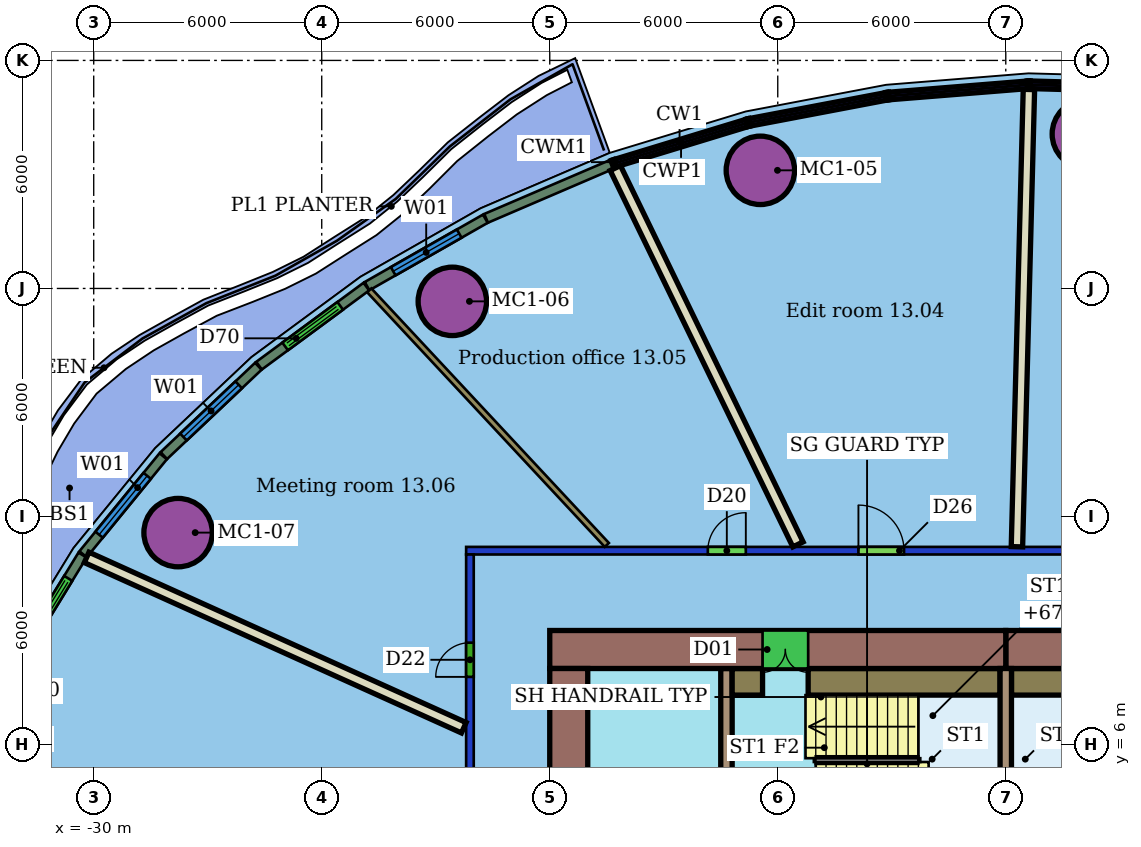
"""IFC4 building model, lengths in metres.
Left out: names, types, materials, properties, quantities, classifications, styles, units other than length and angle.
Written with IfcOpenShell. Run it as: python <this file> out.ifc"""

import sys

from ifc_helpers import new_model, si_unit, direction, frame, frame_2d, origin, origin_2d, place, context, subcontext, project, spatial, rectangle, hollow_circle, extrude, element, fill, save


model = new_model("IFC4")
c1 = context("Model", 3, precision=1e-05, world=origin(), true_north=direction((0.0, 1.0)))
c2 = subcontext(c1, "Body", "Model", "MODEL_VIEW")
j1 = project(units=[si_unit("LENGTHUNIT", "METRE"), si_unit("PLANEANGLEUNIT", "RADIAN")], contexts=[c1])
p1 = place(None, origin())
s1 = spatial("IfcSite", under=j1, at=p1, CompositionType="ELEMENT")
p2 = place(p1, origin())
s2 = spatial("IfcBuilding", under=s1, at=p2, CompositionType="ELEMENT")
p3 = place(p2, frame((0.0, 0.0, 65.6)))
s3 = spatial("IfcBuildingStorey", under=s2, at=p3, CompositionType="ELEMENT", Elevation=65.6)
for number, where, z_axis, x_axis in (
    (1, (-3.879, 22.064, 0.0), (0.0, 0.0, 1.0), (1.0, 0.0, 0.0)),
    (2, (-12.458, 21.108, 0.0), (0.0, 0.0, 1.0), (1.0, 0.0, 0.0)),
    (3, (-20.563, 17.66, 0.0), (0.0, 0.0, 1.0), (1.0, 0.0, 0.0)),
    (4, (-27.78, 11.576, 0.0), (0.0, 0.0, 1.0), (1.0, 0.0, 0.0)),
):
    element("IfcColumn", number, at=place(p3, frame(where, z_axis=z_axis, x_axis=x_axis)), inside=s3, PredefinedType="COLUMN", context=c2, shape_type="SweptSolid", body=[
        extrude(hollow_circle(Radius=0.9, WallThickness=0.06, at=origin_2d()), origin(), (0.0, 0.0, 1.0), 3.55),
    ])
p4 = place(p3, frame((-20.1, -11.0, 0.0), z_axis=(0.0, 0.0, 1.0), x_axis=(0.0, 1.0, 0.0)))
e5 = element("IfcWall", 5, at=p4, inside=s3, PredefinedType="PARTITIONING", context=c2, shape_type="SweptSolid", body=[
    extrude(rectangle(XDim=22.0, YDim=0.2, at=frame_2d((11.0, 0.0))), origin(), (0.0, 0.0, 1.0), 2.85),
])
p5 = place(p4, frame((18.78, 0.0, 0.0)))
e6 = element("IfcOpeningElement", 6, at=p5, cuts=e5, PredefinedType="OPENING", context=c2, shape_type="SweptSolid", body=[
    extrude(rectangle(XDim=0.9, YDim=2.1, at=frame_2d((0.45, 1.05))), frame((0.0, 0.11, 0.0), z_axis=(0.0, -1.0, 0.0), x_axis=(1.0, 0.0, 0.0)), (0.0, 0.0, 1.0), 0.22),
])
p6 = place(p4, frame((14.403, 0.0, 0.0)))
e7 = element("IfcOpeningElement", 7, at=p6, cuts=e5, PredefinedType="OPENING", context=c2, shape_type="SweptSolid", body=[
    extrude(rectangle(XDim=1.1, YDim=2.1, at=frame_2d((0.55, 1.05))), frame((0.0, 0.11, 0.0), z_axis=(0.0, -1.0, 0.0), x_axis=(1.0, 0.0, 0.0)), (0.0, 0.0, 1.0), 0.22),
])
p7 = place(p4, frame((5.9, 0.0, 0.0)))
e8 = element("IfcOpeningElement", 8, at=p7, cuts=e5, PredefinedType="OPENING", context=c2, shape_type="SweptSolid", body=[
    extrude(rectangle(XDim=0.9, YDim=2.1, at=frame_2d((0.45, 1.05))), frame((0.0, 0.11, 0.0), z_axis=(0.0, -1.0, 0.0), x_axis=(1.0, 0.0, 0.0)), (0.0, 0.0, 1.0), 0.22),
])
p8 = place(p4, frame((1.826, 0.0, 0.0)))
e9 = element("IfcOpeningElement", 9, at=p8, cuts=e5, PredefinedType="OPENING", context=c2, shape_type="SweptSolid", body=[
    extrude(rectangle(XDim=1.0, YDim=2.1, at=frame_2d((0.5, 1.05))), frame((0.0, 0.11, 0.0), z_axis=(0.0, -1.0, 0.0), x_axis=(1.0, 0.0, 0.0)), (0.0, 0.0, 1.0), 0.22),
])
p9 = place(p3, frame((-20.2, 11.1, 0.0), z_axis=(0.0, 0.0, 1.0), x_axis=(1.0, 0.0, 0.0)))
e10 = element("IfcWall", 10, at=p9, inside=s3, PredefinedType="PARTITIONING", context=c2, shape_type="SweptSolid", body=[
    extrude(rectangle(XDim=28.4, YDim=0.2, at=frame_2d((14.2, 0.0))), origin(), (0.0, 0.0, 1.0), 2.85),
])
p10 = place(p9, frame((23.828, 0.0, 0.0)))
e11 = element("IfcOpeningElement", 11, at=p10, cuts=e10, PredefinedType="OPENING", context=c2, shape_type="SweptSolid", body=[
    extrude(rectangle(XDim=1.5, YDim=2.1, at=frame_2d((0.75, 1.05))), frame((0.0, 0.11, 0.0), z_axis=(0.0, -1.0, 0.0), x_axis=(1.0, 0.0, 0.0)), (0.0, 0.0, 1.0), 0.22),
])
p11 = place(p9, frame((19.006, 0.0, 0.0)))
e12 = element("IfcOpeningElement", 12, at=p11, cuts=e10, PredefinedType="OPENING", context=c2, shape_type="SweptSolid", body=[
    extrude(rectangle(XDim=1.0, YDim=2.1, at=frame_2d((0.5, 1.05))), frame((0.0, 0.11, 0.0), z_axis=(0.0, -1.0, 0.0), x_axis=(1.0, 0.0, 0.0)), (0.0, 0.0, 1.0), 0.22),
])
p12 = place(p9, frame((10.323, 0.0, 0.0)))
e13 = element("IfcOpeningElement", 13, at=p12, cuts=e10, PredefinedType="OPENING", context=c2, shape_type="SweptSolid", body=[
    extrude(rectangle(XDim=1.2, YDim=2.1, at=frame_2d((0.6, 1.05))), frame((0.0, 0.11, 0.0), z_axis=(0.0, -1.0, 0.0), x_axis=(1.0, 0.0, 0.0)), (0.0, 0.0, 1.0), 0.22),
])
p13 = place(p9, frame((6.36, 0.0, 0.0)))
e14 = element("IfcOpeningElement", 14, at=p13, cuts=e10, PredefinedType="OPENING", context=c2, shape_type="SweptSolid", body=[
    extrude(rectangle(XDim=1.0, YDim=2.1, at=frame_2d((0.5, 1.05))), frame((0.0, 0.11, 0.0), z_axis=(0.0, -1.0, 0.0), x_axis=(1.0, 0.0, 0.0)), (0.0, 0.0, 1.0), 0.22),
])
p14 = place(p3, frame((-5.391, 23.235, 0.0), z_axis=(0.0, 0.0, 1.0), x_axis=(-0.026207995229, -0.999656511501, 0.0)))
e15 = element("IfcWall", 15, at=p14, inside=s3, PredefinedType="PARTITIONING", context=c2, shape_type="SweptSolid", body=[
    extrude(rectangle(XDim=12.036, YDim=0.3, at=frame_2d((6.018, 0.0))), origin(), (0.0, 0.0, 1.0), 3.55),
])
p15 = place(p3, frame((-16.274, 21.168, 0.0), z_axis=(0.0, 0.0, 1.0), x_axis=(0.436660914919, -0.899626169796, 0.0)))
e16 = element("IfcWall", 16, at=p15, inside=s3, PredefinedType="PARTITIONING", context=c2, shape_type="SweptSolid", body=[
    extrude(rectangle(XDim=11.008, YDim=0.3, at=frame_2d((5.504, 0.0))), origin(), (0.0, 0.0, 1.0), 3.55),
])
p16 = place(p3, frame((-22.749, 17.95, 0.0), z_axis=(0.0, 0.0, 1.0), x_axis=(0.682209065128, -0.731157159205, 0.0)))
e17 = element("IfcWall", 17, at=p16, inside=s3, PredefinedType="PARTITIONING", context=c2, shape_type="SweptSolid", body=[
    extrude(rectangle(XDim=9.163, YDim=0.15, at=frame_2d((4.581, 0.0))), origin(), (0.0, 0.0, 1.0), 3.55),
])
p17 = place(p3, frame((-30.186, 10.924, 0.0), z_axis=(0.0, 0.0, 1.0), x_axis=(0.91135893381, -0.411612552973, 0.0)))
e18 = element("IfcWall", 18, at=p17, inside=s3, PredefinedType="PARTITIONING", context=c2, shape_type="SweptSolid", body=[
    extrude(rectangle(XDim=10.889, YDim=0.3, at=frame_2d((5.445, 0.0))), origin(), (0.0, 0.0, 1.0), 3.55),
])
p18 = place(p3, frame((-16.368, 21.264, 0.0), z_axis=(0.0, 0.0, 1.0), x_axis=(-0.918983536415, -0.394295903857, 0.0)))
e19 = element("IfcWall", 19, at=p18, inside=s3, PredefinedType="SOLIDWALL", context=c2, shape_type="SweptSolid", body=[
    extrude(rectangle(XDim=3.599, YDim=0.25, at=frame_2d((1.799, 0.0))), origin(), (0.0, 0.0, 1.0), 3.15),
])
p19 = place(p3, frame((-19.695, 19.835, 0.0), z_axis=(0.0, 0.0, 1.0), x_axis=(-0.868745900063, -0.495258075273, 0.0)))
e20 = element("IfcWall", 20, at=p19, inside=s3, PredefinedType="SOLIDWALL", context=c2, shape_type="SweptSolid", body=[
    extrude(rectangle(XDim=3.583, YDim=0.25, at=frame_2d((1.792, 0.0))), origin(), (0.0, 0.0, 1.0), 3.15),
])
p20 = place(p19, frame((0.791, 0.0, 0.8)))
e21 = element("IfcOpeningElement", 21, at=p20, cuts=e20, PredefinedType="OPENING", context=c2, shape_type="SweptSolid", body=[
    extrude(rectangle(XDim=2.0, YDim=2.2, at=frame_2d((1.0, 1.1))), frame((0.0, 0.135, 0.0), z_axis=(0.0, -1.0, 0.0), x_axis=(1.0, 0.0, 0.0)), (0.0, 0.0, 1.0), 0.27),
])
p21 = place(p3, frame((-22.826, 18.049, 0.0), z_axis=(0.0, 0.0, 1.0), x_axis=(-0.805090824586, -0.593151552444, 0.0)))
e22 = element("IfcWall", 22, at=p21, inside=s3, PredefinedType="SOLIDWALL", context=c2, shape_type="SweptSolid", body=[
    extrude(rectangle(XDim=3.508, YDim=0.25, at=frame_2d((1.754, 0.0))), origin(), (0.0, 0.0, 1.0), 3.15),
])
p22 = place(p21, frame((0.854, 0.0, 0.0)))
e23 = element("IfcOpeningElement", 23, at=p22, cuts=e22, PredefinedType="OPENING", context=c2, shape_type="SweptSolid", body=[
    extrude(rectangle(XDim=1.8, YDim=2.4, at=frame_2d((0.9, 1.2))), frame((0.0, 0.135, 0.0), z_axis=(0.0, -1.0, 0.0), x_axis=(1.0, 0.0, 0.0)), (0.0, 0.0, 1.0), 0.27),
])
p23 = place(p3, frame((-25.668, 15.953, 0.0), z_axis=(0.0, 0.0, 1.0), x_axis=(-0.726835063379, -0.686812048994, 0.0)))
e24 = element("IfcWall", 24, at=p23, inside=s3, PredefinedType="SOLIDWALL", context=c2, shape_type="SweptSolid", body=[
    extrude(rectangle(XDim=3.422, YDim=0.25, at=frame_2d((1.711, 0.0))), origin(), (0.0, 0.0, 1.0), 3.15),
])
p24 = place(p23, frame((0.711, 0.0, 0.8)))
e25 = element("IfcOpeningElement", 25, at=p24, cuts=e24, PredefinedType="OPENING", context=c2, shape_type="SweptSolid", body=[
    extrude(rectangle(XDim=2.0, YDim=2.2, at=frame_2d((1.0, 1.1))), frame((0.0, 0.135, 0.0), z_axis=(0.0, -1.0, 0.0), x_axis=(1.0, 0.0, 0.0)), (0.0, 0.0, 1.0), 0.27),
])
p25 = place(p3, frame((-28.172, 13.585, 0.0), z_axis=(0.0, 0.0, 1.0), x_axis=(-0.632874527105, -0.774254372246, 0.0)))
e26 = element("IfcWall", 26, at=p25, inside=s3, PredefinedType="SOLIDWALL", context=c2, shape_type="SweptSolid", body=[
    extrude(rectangle(XDim=3.331, YDim=0.25, at=frame_2d((1.666, 0.0))), origin(), (0.0, 0.0, 1.0), 3.15),
])
p26 = place(p25, frame((0.666, 0.0, 0.8)))
e27 = element("IfcOpeningElement", 27, at=p26, cuts=e26, PredefinedType="OPENING", context=c2, shape_type="SweptSolid", body=[
    extrude(rectangle(XDim=2.0, YDim=2.2, at=frame_2d((1.0, 1.1))), frame((0.0, 0.135, 0.0), z_axis=(0.0, -1.0, 0.0), x_axis=(1.0, 0.0, 0.0)), (0.0, 0.0, 1.0), 0.27),
])
p27 = place(p3, frame((-30.294, 10.985, 0.0), z_axis=(0.0, 0.0, 1.0), x_axis=(-0.522692781457, -0.852521117752, 0.0)))
e28 = element("IfcWall", 28, at=p27, inside=s3, PredefinedType="SOLIDWALL", context=c2, shape_type="SweptSolid", body=[
    extrude(rectangle(XDim=3.241, YDim=0.25, at=frame_2d((1.62, 0.0))), origin(), (0.0, 0.0, 1.0), 3.15),
])
p28 = place(p27, frame((0.72, 0.0, 0.0)))
e29 = element("IfcOpeningElement", 29, at=p28, cuts=e28, PredefinedType="OPENING", context=c2, shape_type="SweptSolid", body=[
    extrude(rectangle(XDim=1.8, YDim=2.4, at=frame_2d((0.9, 1.2))), frame((0.0, 0.135, 0.0), z_axis=(0.0, -1.0, 0.0), x_axis=(1.0, 0.0, 0.0)), (0.0, 0.0, 1.0), 0.27),
])
p29 = place(p3, frame((6.0, 8.5, 0.0), z_axis=(0.0, 0.0, 1.0), x_axis=(-1.0, 0.0, 0.0)))
e30 = element("IfcWall", 30, at=p29, inside=s3, PredefinedType="SHEAR", context=c2, shape_type="SweptSolid", body=[
    extrude(rectangle(XDim=12.0, YDim=1.0, at=frame_2d((6.0, 0.0))), origin(), (0.0, 0.0, 1.0), 3.4),
])
p30 = place(p29, frame((5.6, 0.0, 0.0)))
e31 = element("IfcOpeningElement", 31, at=p30, cuts=e30, PredefinedType="OPENING", context=c2, shape_type="SweptSolid", body=[
    extrude(rectangle(XDim=1.2, YDim=2.1, at=frame_2d((0.6, 1.05))), frame((0.0, 0.51, 0.0), z_axis=(0.0, -1.0, 0.0), x_axis=(1.0, 0.0, 0.0)), (0.0, 0.0, 1.0), 1.02),
])
p31 = place(p3, frame((-6.0, 8.5, 0.0), z_axis=(0.0, 0.0, 1.0), x_axis=(-1.0, 0.0, 0.0)))
e32 = element("IfcWall", 32, at=p31, inside=s3, PredefinedType="SHEAR", context=c2, shape_type="SweptSolid", body=[
    extrude(rectangle(XDim=12.0, YDim=1.0, at=frame_2d((6.0, 0.0))), origin(), (0.0, 0.0, 1.0), 3.4),
])
p32 = place(p31, frame((5.2, 0.0, 0.0)))
e33 = element("IfcOpeningElement", 33, at=p32, cuts=e32, PredefinedType="OPENING", context=c2, shape_type="SweptSolid", body=[
    extrude(rectangle(XDim=1.2, YDim=2.1, at=frame_2d((0.6, 1.05))), frame((0.0, 0.51, 0.0), z_axis=(0.0, -1.0, 0.0), x_axis=(1.0, 0.0, 0.0)), (0.0, 0.0, 1.0), 1.02),
])
p33 = place(p3, frame((-17.5, 8.0, 0.0), z_axis=(0.0, 0.0, 1.0), x_axis=(0.0, -1.0, 0.0)))
e34 = element("IfcWall", 34, at=p33, inside=s3, PredefinedType="SHEAR", context=c2, shape_type="SweptSolid", body=[
    extrude(rectangle(XDim=16.0, YDim=1.0, at=frame_2d((8.0, 0.0))), origin(), (0.0, 0.0, 1.0), 3.4),
])
p34 = place(p33, frame((11.9, 0.0, 0.0)))
e35 = element("IfcOpeningElement", 35, at=p34, cuts=e34, PredefinedType="OPENING", context=c2, shape_type="SweptSolid", body=[
    extrude(rectangle(XDim=1.2, YDim=2.1, at=frame_2d((0.6, 1.05))), frame((0.0, 0.51, 0.0), z_axis=(0.0, -1.0, 0.0), x_axis=(1.0, 0.0, 0.0)), (0.0, 0.0, 1.0), 1.02),
])
p35 = place(p33, frame((2.9, 0.0, 0.0)))
e36 = element("IfcOpeningElement", 36, at=p35, cuts=e34, PredefinedType="OPENING", context=c2, shape_type="SweptSolid", body=[
    extrude(rectangle(XDim=1.2, YDim=2.1, at=frame_2d((0.6, 1.05))), frame((0.0, 0.51, 0.0), z_axis=(0.0, -1.0, 0.0), x_axis=(1.0, 0.0, 0.0)), (0.0, 0.0, 1.0), 1.02),
])
p36 = place(p3, frame((-13.35, 8.0, 0.0), z_axis=(0.0, 0.0, 1.0), x_axis=(0.0, -1.0, 0.0)))
e37 = element("IfcWall", 37, at=p36, inside=s3, PredefinedType="SHEAR", context=c2, shape_type="SweptSolid", body=[
    extrude(rectangle(XDim=16.0, YDim=0.3, at=frame_2d((8.0, 0.0))), origin(), (0.0, 0.0, 1.0), 3.4),
])
p37 = place(p36, frame((7.25, 0.0, 0.0)))
e38 = element("IfcOpeningElement", 38, at=p37, cuts=e37, PredefinedType="OPENING", context=c2, shape_type="SweptSolid", body=[
    extrude(rectangle(XDim=1.5, YDim=2.1, at=frame_2d((0.75, 1.05))), frame((0.0, 0.16, 0.0), z_axis=(0.0, -1.0, 0.0), x_axis=(1.0, 0.0, 0.0)), (0.0, 0.0, 1.0), 0.32),
])
p38 = place(p3, frame((-6.0, 3.88, 0.0), z_axis=(0.0, 0.0, 1.0), x_axis=(0.0, 1.0, 0.0)))
e39 = element("IfcWall", 39, at=p38, inside=s3, PredefinedType="SHEAR", context=c2, shape_type="SweptSolid", body=[
    extrude(rectangle(XDim=4.12, YDim=0.3, at=frame_2d((2.06, 0.0))), origin(), (0.0, 0.0, 1.0), 3.4),
])
p39 = place(p3, frame((-13.2, 7.65, 0.0), z_axis=(0.0, 0.0, 1.0), x_axis=(1.0, 0.0, 0.0)))
e40 = element("IfcWall", 40, at=p39, inside=s3, PredefinedType="SHEAR", context=c2, shape_type="SweptSolid", body=[
    extrude(rectangle(XDim=0.8, YDim=0.7, at=frame_2d((0.4, 0.0))), origin(), (0.0, 0.0, 1.0), 3.4),
])
for number, where, z_axis, x_axis in (
    (41, (-11.2, 7.65, 0.0), (0.0, 0.0, 1.0), (1.0, 0.0, 0.0)),
    (42, (-5.85, 7.65, 0.0), (0.0, 0.0, 1.0), (1.0, 0.0, 0.0)),
):
    element("IfcWall", number, at=place(p3, frame(where, z_axis=z_axis, x_axis=x_axis)), inside=s3, PredefinedType="SHEAR", context=c2, shape_type="SweptSolid", body=[
        extrude(rectangle(XDim=5.05, YDim=0.7, at=frame_2d((2.525, 0.0))), origin(), (0.0, 0.0, 1.0), 3.4),
    ])
p40 = place(p12, origin())
e43 = element("IfcDoor", 43, at=p40, inside=s3, OperationType="SINGLE_SWING_LEFT", PredefinedType="DOOR", context=c2, shape_type="SweptSolid", body=[
    extrude(rectangle(XDim=1.2, YDim=2.1, at=frame_2d((0.6, 1.05))), frame((0.0, 0.025, 0.0), z_axis=(0.0, -1.0, 0.0), x_axis=(1.0, 0.0, 0.0)), (0.0, 0.0, 1.0), 0.05),
])
fill(e13, e43)
p41 = place(p13, origin())
e44 = element("IfcDoor", 44, at=p41, inside=s3, OperationType="SINGLE_SWING_RIGHT", PredefinedType="DOOR", context=c2, shape_type="SweptSolid", body=[
    extrude(rectangle(XDim=1.0, YDim=2.1, at=frame_2d((0.5, 1.05))), frame((0.0, 0.025, 0.0), z_axis=(0.0, -1.0, 0.0), x_axis=(1.0, 0.0, 0.0)), (0.0, 0.0, 1.0), 0.05),
])
fill(e14, e44)
p42 = place(p5, origin())
e45 = element("IfcDoor", 45, at=p42, inside=s3, OperationType="SINGLE_SWING_LEFT", PredefinedType="DOOR", context=c2, shape_type="SweptSolid", body=[
    extrude(rectangle(XDim=0.9, YDim=2.1, at=frame_2d((0.45, 1.05))), frame((0.0, 0.025, 0.0), z_axis=(0.0, -1.0, 0.0), x_axis=(1.0, 0.0, 0.0)), (0.0, 0.0, 1.0), 0.05),
])
fill(e6, e45)
p43 = place(p20, origin())
e46 = element("IfcWindow", 46, at=p43, inside=s3, PartitioningType="SINGLE_PANEL", PredefinedType="WINDOW", context=c2, shape_type="SweptSolid", body=[
    extrude(rectangle(XDim=2.0, YDim=2.2, at=frame_2d((1.0, 1.1))), frame((0.0, 0.03, 0.0), z_axis=(0.0, -1.0, 0.0), x_axis=(1.0, 0.0, 0.0)), (0.0, 0.0, 1.0), 0.06),
])
fill(e21, e46)
p44 = place(p22, origin())
e47 = element("IfcDoor", 47, at=p44, inside=s3, OperationType="DOUBLE_DOOR_SLIDING", PredefinedType="DOOR", context=c2, shape_type="SweptSolid", body=[
    extrude(rectangle(XDim=1.8, YDim=2.4, at=frame_2d((0.9, 1.2))), frame((0.0, 0.025, 0.0), z_axis=(0.0, -1.0, 0.0), x_axis=(1.0, 0.0, 0.0)), (0.0, 0.0, 1.0), 0.05),
])
fill(e23, e47)
p45 = place(p24, origin())
e48 = element("IfcWindow", 48, at=p45, inside=s3, PartitioningType="SINGLE_PANEL", PredefinedType="WINDOW", context=c2, shape_type="SweptSolid", body=[
    extrude(rectangle(XDim=2.0, YDim=2.2, at=frame_2d((1.0, 1.1))), frame((0.0, 0.03, 0.0), z_axis=(0.0, -1.0, 0.0), x_axis=(1.0, 0.0, 0.0)), (0.0, 0.0, 1.0), 0.06),
])
fill(e25, e48)
p46 = place(p26, origin())
e49 = element("IfcWindow", 49, at=p46, inside=s3, PartitioningType="SINGLE_PANEL", PredefinedType="WINDOW", context=c2, shape_type="SweptSolid", body=[
    extrude(rectangle(XDim=2.0, YDim=2.2, at=frame_2d((1.0, 1.1))), frame((0.0, 0.03, 0.0), z_axis=(0.0, -1.0, 0.0), x_axis=(1.0, 0.0, 0.0)), (0.0, 0.0, 1.0), 0.06),
])
fill(e27, e49)
p47 = place(p28, origin())
e50 = element("IfcDoor", 50, at=p47, inside=s3, OperationType="DOUBLE_DOOR_SLIDING", PredefinedType="DOOR", context=c2, shape_type="SweptSolid", body=[
    extrude(rectangle(XDim=1.8, YDim=2.4, at=frame_2d((0.9, 1.2))), frame((0.0, 0.025, 0.0), z_axis=(0.0, -1.0, 0.0), x_axis=(1.0, 0.0, 0.0)), (0.0, 0.0, 1.0), 0.05),
])
fill(e29, e50)
p48 = place(p32, origin())
e51 = element("IfcDoor", 51, at=p48, inside=s3, OperationType="DOUBLE_DOOR_SINGLE_SWING", PredefinedType="NOTDEFINED", context=c2, shape_type="SweptSolid", body=[
    extrude(rectangle(XDim=1.2, YDim=2.1, at=frame_2d((0.6, 1.05))), frame((0.0, 0.025, 0.0), z_axis=(0.0, -1.0, 0.0), x_axis=(1.0, 0.0, 0.0)), (0.0, 0.0, 1.0), 0.05),
])
fill(e33, e51)
save(model, sys.argv[1])
